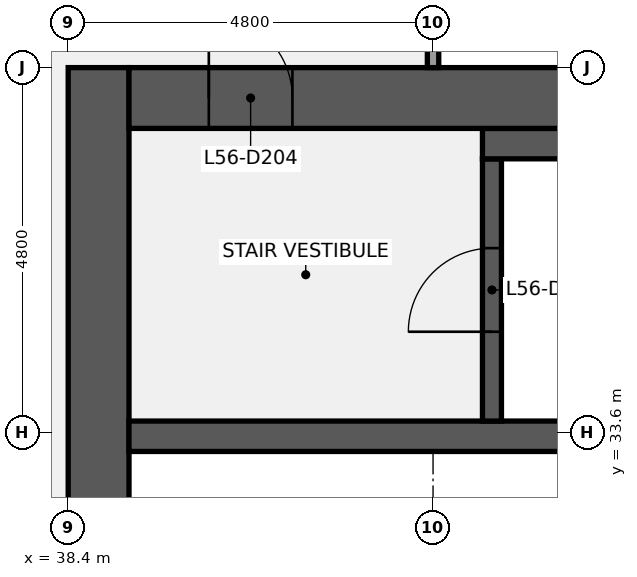
"""IFC4 building model, lengths in metres.
Left out: names, types, materials, properties, quantities, classifications, styles, units other than length and angle.
Written with IfcOpenShell. Run it as: python <this file> out.ifc"""

import sys

from ifc_helpers import new_model, si_unit, direction, frame, frame_2d, origin, place, context, subcontext, project, spatial, rectangle, extrude, element, fill, save


model = new_model("IFC4")
c1 = context("Model", 3, precision=1e-05, world=origin(), true_north=direction((0.0, 1.0)))
c2 = subcontext(c1, "Body", "Model", "MODEL_VIEW")
j1 = project(units=[si_unit("LENGTHUNIT", "METRE"), si_unit("PLANEANGLEUNIT", "RADIAN")], contexts=[c1])
p1 = place(None, origin())
s1 = spatial("IfcSite", under=j1, at=p1, CompositionType="ELEMENT")
p2 = place(p1, origin())
s2 = spatial("IfcBuilding", under=s1, at=p2, CompositionType="ELEMENT")
p3 = place(p2, frame((0.0, 0.0, 253.2)))
s3 = spatial("IfcBuildingStorey", under=s2, at=p3, CompositionType="ELEMENT", Elevation=253.2)
p4 = place(p3, frame((38.8, 9.6, 0.0), z_axis=(0.0, 0.0, 1.0), x_axis=(0.0, 1.0, 0.0)))
e1 = element("IfcWall", 1, at=p4, inside=s3, PredefinedType="SHEAR", context=c2, shape_type="SweptSolid", body=[
    extrude(rectangle(XDim=28.8, YDim=0.8, at=frame_2d((14.4, 0.0))), origin(), (0.0, 0.0, 1.0), 3.84),
])
p5 = place(p4, frame((8.7, 0.0, 0.0)))
e2 = element("IfcOpeningElement", 2, at=p5, cuts=e1, PredefinedType="OPENING", context=c2, shape_type="SweptSolid", body=[
    extrude(rectangle(XDim=1.8, YDim=2.1, at=frame_2d((0.9, 1.05))), frame((0.0, 0.41, 0.0), z_axis=(0.0, -1.0, 0.0), x_axis=(1.0, 0.0, 0.0)), (0.0, 0.0, 1.0), 0.82),
])
p6 = place(p4, frame((18.3, 0.0, 0.0)))
e3 = element("IfcOpeningElement", 3, at=p6, cuts=e1, PredefinedType="OPENING", context=c2, shape_type="SweptSolid", body=[
    extrude(rectangle(XDim=1.8, YDim=2.1, at=frame_2d((0.9, 1.05))), frame((0.0, 0.41, 0.0), z_axis=(0.0, -1.0, 0.0), x_axis=(1.0, 0.0, 0.0)), (0.0, 0.0, 1.0), 0.82),
])
p7 = place(p3, frame((39.2, 33.55, 0.0), z_axis=(0.0, 0.0, 1.0), x_axis=(1.0, 0.0, 0.0)))
e4 = element("IfcWall", 4, at=p7, inside=s3, PredefinedType="SHEAR", context=c2, shape_type="SweptSolid", body=[
    extrude(rectangle(XDim=17.6, YDim=0.4, at=frame_2d((8.8, 0.0))), origin(), (0.0, 0.0, 1.0), 3.84),
])
p8 = place(p3, frame((43.975, 33.75, 0.0), z_axis=(0.0, 0.0, 1.0), x_axis=(0.0, 1.0, 0.0)))
e5 = element("IfcWall", 5, at=p8, inside=s3, PredefinedType="SHEAR", context=c2, shape_type="SweptSolid", body=[
    extrude(rectangle(XDim=3.45, YDim=0.25, at=frame_2d((1.725, 0.0))), origin(), (0.0, 0.0, 1.0), 3.84),
])
p9 = place(p8, frame((1.175, 0.0, 0.0)))
e6 = element("IfcOpeningElement", 6, at=p9, cuts=e5, PredefinedType="OPENING", context=c2, shape_type="SweptSolid", body=[
    extrude(rectangle(XDim=1.1, YDim=2.1, at=frame_2d((0.55, 1.05))), frame((0.0, 0.135, 0.0), z_axis=(0.0, -1.0, 0.0), x_axis=(1.0, 0.0, 0.0)), (0.0, 0.0, 1.0), 0.27),
])
p10 = place(p3, frame((43.85, 37.4, 0.0), z_axis=(0.0, 0.0, 1.0), x_axis=(1.0, 0.0, 0.0)))
e7 = element("IfcWall", 7, at=p10, inside=s3, PredefinedType="SHEAR", context=c2, shape_type="SweptSolid", body=[
    extrude(rectangle(XDim=4.15, YDim=0.4, at=frame_2d((2.075, 0.0))), origin(), (0.0, 0.0, 1.0), 3.84),
])
p11 = place(p3, frame((39.2, 38.0, 0.0), z_axis=(0.0, 0.0, 1.0), x_axis=(1.0, 0.0, 0.0)))
e8 = element("IfcWall", 8, at=p11, inside=s3, PredefinedType="SHEAR", context=c2, shape_type="SweptSolid", body=[
    extrude(rectangle(XDim=8.8, YDim=0.8, at=frame_2d((4.4, 0.0))), origin(), (0.0, 0.0, 1.0), 3.84),
])
p12 = place(p11, frame((1.05, 0.0, 0.0)))
e9 = element("IfcOpeningElement", 9, at=p12, cuts=e8, PredefinedType="OPENING", context=c2, shape_type="SweptSolid", body=[
    extrude(rectangle(XDim=1.1, YDim=2.1, at=frame_2d((0.55, 1.05))), frame((0.0, 0.41, 0.0), z_axis=(0.0, -1.0, 0.0), x_axis=(1.0, 0.0, 0.0)), (0.0, 0.0, 1.0), 0.82),
])
p13 = place(p3, frame((43.2, 38.4, 0.0), z_axis=(0.0, 0.0, 1.0), x_axis=(0.0, 1.0, 0.0)))
e10 = element("IfcWall", 10, at=p13, inside=s3, PredefinedType="PARTITIONING", context=c2, shape_type="SweptSolid", body=[
    extrude(rectangle(XDim=2.325, YDim=0.15, at=frame_2d((1.163, 0.0))), origin(), (0.0, 0.0, 1.0), 2.849),
])
p14 = place(p13, frame((0.663, 0.0, 0.0)))
e11 = element("IfcOpeningElement", 11, at=p14, cuts=e10, PredefinedType="OPENING", context=c2, shape_type="SweptSolid", body=[
    extrude(rectangle(XDim=1.0, YDim=2.1, at=frame_2d((0.5, 1.05))), frame((0.0, 0.085, 0.0), z_axis=(0.0, -1.0, 0.0), x_axis=(1.0, 0.0, 0.0)), (0.0, 0.0, 1.0), 0.17),
])
p15 = place(p9, origin())
e12 = element("IfcDoor", 12, at=p15, inside=s3, OperationType="SINGLE_SWING_LEFT", PredefinedType="DOOR", context=c2, shape_type="SweptSolid", body=[
    extrude(rectangle(XDim=1.1, YDim=2.1, at=frame_2d((0.55, 1.05))), frame((0.0, 0.025, 0.0), z_axis=(0.0, -1.0, 0.0), x_axis=(1.0, 0.0, 0.0)), (0.0, 0.0, 1.0), 0.05),
])
fill(e6, e12)
p16 = place(p12, origin())
e13 = element("IfcDoor", 13, at=p16, inside=s3, OperationType="SINGLE_SWING_LEFT", PredefinedType="DOOR", context=c2, shape_type="SweptSolid", body=[
    extrude(rectangle(XDim=1.1, YDim=2.1, at=frame_2d((0.55, 1.05))), frame((0.0, 0.025, 0.0), z_axis=(0.0, -1.0, 0.0), x_axis=(1.0, 0.0, 0.0)), (0.0, 0.0, 1.0), 0.05),
])
fill(e9, e13)
save(model, sys.argv[1])
